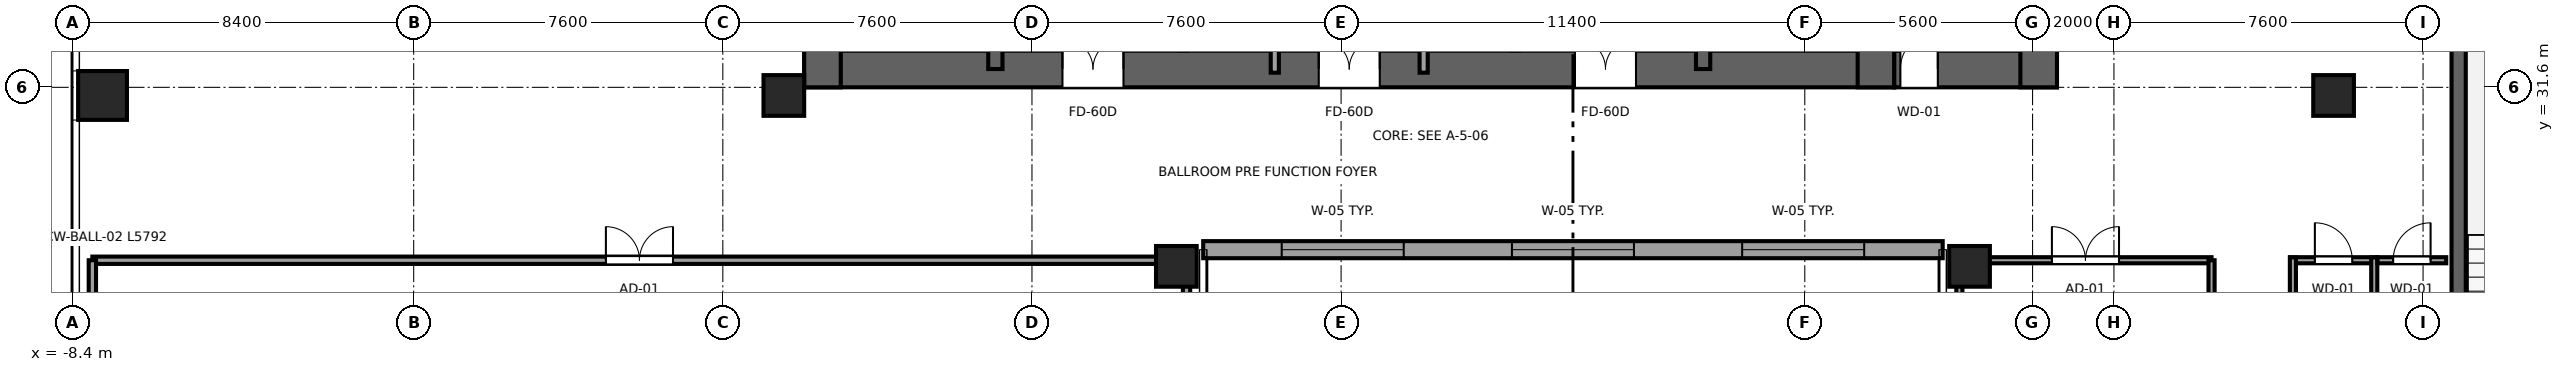
"""IFC4 building model, lengths in metres.
Left out: names, types, materials, properties, quantities, classifications, styles, units other than length and angle.
Written with IfcOpenShell. Run it as: python <this file> out.ifc"""

import sys

from ifc_helpers import new_model, si_unit, direction, frame, frame_2d, origin, origin_2d, place, context, subcontext, project, spatial, rectangle, circle, extrude, source, transform, mapped, element, fill, save


model = new_model("IFC4")
c1 = context("Model", 3, precision=1e-05, world=origin(), true_north=direction((0.0, 1.0)))
c2 = subcontext(c1, "Body", "Model", "MODEL_VIEW")
j1 = project(units=[si_unit("LENGTHUNIT", "METRE"), si_unit("PLANEANGLEUNIT", "RADIAN")], contexts=[c1])
p1 = place(None, origin())
s1 = spatial("IfcSite", under=j1, at=p1, CompositionType="ELEMENT")
p2 = place(p1, origin())
s2 = spatial("IfcBuilding", under=s1, at=p2, CompositionType="ELEMENT")
p3 = place(p2, frame((0.0, 0.0, 16.0)))
s3 = spatial("IfcBuildingStorey", under=s2, at=p3, CompositionType="ELEMENT", Elevation=16.0)
p4 = place(p3, frame((9.6, 32.05, 0.0), z_axis=(0.0, 0.0, 1.0), x_axis=(1.0, 0.0, 0.0)))
e1 = element("IfcWall", 1, at=p4, inside=s3, PredefinedType="SHEAR", context=c2, shape_type="SweptSolid", body=[
    extrude(rectangle(XDim=26.8, YDim=0.9, at=frame_2d((13.4, 0.0))), origin(), (0.0, 0.0, 1.0), 6.4),
])
p5 = place(p4, frame((7.85, 0.0, 0.0), z_axis=(0.0, 0.0, 1.0), x_axis=(-1.0, 0.0, 0.0)))
e2 = element("IfcOpeningElement", 2, at=p5, cuts=e1, PredefinedType="OPENING", context=c2, shape_type="SweptSolid", body=[
    extrude(rectangle(XDim=1.5, YDim=2.04, at=frame_2d((0.75, 1.02))), frame((0.0, 0.46, 0.0), z_axis=(0.0, -1.0, 0.0), x_axis=(1.0, 0.0, 0.0)), (0.0, 0.0, 1.0), 0.92),
])
p6 = place(p4, frame((14.15, 0.0, 0.0), z_axis=(0.0, 0.0, 1.0), x_axis=(-1.0, 0.0, 0.0)))
e3 = element("IfcOpeningElement", 3, at=p6, cuts=e1, PredefinedType="OPENING", context=c2, shape_type="SweptSolid", body=[
    extrude(rectangle(XDim=1.5, YDim=2.04, at=frame_2d((0.75, 1.02))), frame((0.0, 0.46, 0.0), z_axis=(0.0, -1.0, 0.0), x_axis=(1.0, 0.0, 0.0)), (0.0, 0.0, 1.0), 0.92),
])
p7 = place(p4, frame((20.45, 0.0, 0.0), z_axis=(0.0, 0.0, 1.0), x_axis=(-1.0, 0.0, 0.0)))
e4 = element("IfcOpeningElement", 4, at=p7, cuts=e1, PredefinedType="OPENING", context=c2, shape_type="SweptSolid", body=[
    extrude(rectangle(XDim=1.5, YDim=2.04, at=frame_2d((0.75, 1.02))), frame((0.0, 0.46, 0.0), z_axis=(0.0, -1.0, 0.0), x_axis=(1.0, 0.0, 0.0)), (0.0, 0.0, 1.0), 0.92),
])
for number, where, z_axis, x_axis in (
    (5, (10.05, 31.6, 0.0), (0.0, 0.0, 1.0), (0.0, 1.0, 0.0)),
    (6, (35.95, 31.6, 0.0), (0.0, 0.0, 1.0), (0.0, 1.0, 0.0)),
):
    element("IfcWall", number, at=place(p3, frame(where, z_axis=z_axis, x_axis=x_axis)), inside=s3, PredefinedType="SHEAR", context=c2, shape_type="SweptSolid", body=[
        extrude(rectangle(XDim=13.6, YDim=0.9, at=frame_2d((6.8, 0.0))), origin(), (0.0, 0.0, 1.0), 6.4),
    ])
p8 = place(p3, frame((14.3, 32.05, 0.0), z_axis=(0.0, 0.0, 1.0), x_axis=(0.0, 1.0, 0.0)))
e7 = element("IfcWall", 7, at=p8, inside=s3, PredefinedType="SHEAR", context=c2, shape_type="SweptSolid", body=[
    extrude(rectangle(XDim=12.7, YDim=0.35, at=frame_2d((6.35, 0.0))), origin(), (0.0, 0.0, 1.0), 6.4),
])
p9 = place(p8, frame((0.5, 0.0, 0.0)))
e8 = element("IfcOpeningElement", 8, at=p9, cuts=e7, PredefinedType="OPENING", context=c2, shape_type="SweptSolid", body=[
    extrude(rectangle(XDim=1.1, YDim=2.12, at=frame_2d((0.55, 1.06))), frame((0.0, 0.185, 0.0), z_axis=(0.0, -1.0, 0.0), x_axis=(1.0, 0.0, 0.0)), (0.0, 0.0, 1.0), 0.37),
])
p10 = place(p3, frame((31.7, 32.05, 0.0), z_axis=(0.0, 0.0, 1.0), x_axis=(0.0, 1.0, 0.0)))
e9 = element("IfcWall", 9, at=p10, inside=s3, PredefinedType="SHEAR", context=c2, shape_type="SweptSolid", body=[
    extrude(rectangle(XDim=12.7, YDim=0.35, at=frame_2d((6.35, 0.0))), origin(), (0.0, 0.0, 1.0), 6.4),
])
p11 = place(p10, frame((1.6, 0.0, 0.0), z_axis=(0.0, 0.0, 1.0), x_axis=(-1.0, 0.0, 0.0)))
e10 = element("IfcOpeningElement", 10, at=p11, cuts=e9, PredefinedType="OPENING", context=c2, shape_type="SweptSolid", body=[
    extrude(rectangle(XDim=1.1, YDim=2.12, at=frame_2d((0.55, 1.06))), frame((0.0, 0.185, 0.0), z_axis=(0.0, -1.0, 0.0), x_axis=(1.0, 0.0, 0.0)), (0.0, 0.0, 1.0), 0.37),
])
p12 = place(p3, frame((36.4, 32.05, 0.0), z_axis=(0.0, 0.0, 1.0), x_axis=(1.0, 0.0, 0.0)))
e11 = element("IfcWall", 11, at=p12, inside=s3, PredefinedType="SHEAR", context=c2, shape_type="SweptSolid", body=[
    extrude(rectangle(XDim=4.0, YDim=0.9, at=frame_2d((2.0, 0.0))), origin(), (0.0, 0.0, 1.0), 6.4),
])
p13 = place(p12, frame((1.07, 0.0, 0.0), z_axis=(0.0, 0.0, 1.0), x_axis=(-1.0, 0.0, 0.0)))
e12 = element("IfcOpeningElement", 12, at=p13, cuts=e11, PredefinedType="OPENING", context=c2, shape_type="SweptSolid", body=[
    extrude(rectangle(XDim=0.92, YDim=2.01, at=frame_2d((0.46, 1.005))), frame((0.0, 0.46, 0.0), z_axis=(0.0, -1.0, 0.0), x_axis=(1.0, 0.0, 0.0)), (0.0, 0.0, 1.0), 0.92),
])
p14 = place(p3, frame((39.95, 31.6, 0.0), z_axis=(0.0, 0.0, 1.0), x_axis=(0.0, 1.0, 0.0)))
e13 = element("IfcWall", 13, at=p14, inside=s3, PredefinedType="SHEAR", context=c2, shape_type="SweptSolid", body=[
    extrude(rectangle(XDim=13.6, YDim=0.9, at=frame_2d((6.8, 0.0))), origin(), (0.0, 0.0, 1.0), 6.4),
])
p15 = place(p3, frame((50.275, 32.975, 0.0), z_axis=(0.0, 0.0, 1.0), x_axis=(0.0, -1.0, 0.0)))
e14 = element("IfcWall", 14, at=p15, inside=s3, PredefinedType="SHEAR", context=c2, shape_type="SweptSolid", body=[
    extrude(rectangle(XDim=12.95, YDim=0.35, at=frame_2d((6.475, 0.0))), origin(), (0.0, 0.0, 1.0), 6.4),
])
m1 = source(origin(), c2, "Body", "SweptSolid", [
    extrude(rectangle(XDim=1.2, YDim=1.2, at=origin_2d()), origin(), (0.0, 0.0, 1.0), 6.4),
])
p16 = place(p3, frame((-7.65, 31.4, 0.0), z_axis=(0.0, 0.0, 1.0), x_axis=(1.0, 0.0, 0.0)))
e15 = element("IfcColumn", 15, at=p16, inside=s3, PredefinedType="COLUMN", context=c2, shape_type="MappedRepresentation", body=[
    mapped(m1, transform((0.0, 0.0, 0.0), x_axis=(1.0, 0.0, 0.0), y_axis=(0.0, 1.0, 0.0), z_axis=(0.0, 0.0, 1.0), scale=1.0)),
])
m2 = source(origin(), c2, "Body", "SweptSolid", [
    extrude(circle(Radius=0.5, at=origin_2d()), origin(), (0.0, 0.0, 1.0), 6.4),
])
for number, where, z_axis, x_axis in (
    (16, (18.75, 27.2, 0.0), (0.0, 0.0, 1.0), (1.0, 0.0, 0.0)),
    (17, (38.25, 27.2, 0.0), (0.0, 0.0, 1.0), (1.0, 0.0, 0.0)),
):
    element("IfcColumn", number, at=place(p3, frame(where, z_axis=z_axis, x_axis=x_axis)), inside=s3, PredefinedType="COLUMN", context=c2, shape_type="MappedRepresentation", body=[
        mapped(m2, transform((0.0, 0.0, 0.0), x_axis=(1.0, 0.0, 0.0), y_axis=(0.0, 1.0, 0.0), z_axis=(0.0, 0.0, 1.0), scale=1.0)),
    ])
m3 = source(origin(), c2, "Body", "SweptSolid", [
    extrude(rectangle(XDim=1.0, YDim=1.0, at=origin_2d()), origin(), (0.0, 0.0, 1.0), 6.4),
])
for number, where, z_axis, x_axis in (
    (18, (47.2, 31.4, 0.0), (0.0, 0.0, 1.0), (1.0, 0.0, 0.0)),
    (19, (9.1, 31.4, 0.0), (0.0, 0.0, 1.0), (1.0, 0.0, 0.0)),
):
    element("IfcColumn", number, at=place(p3, frame(where, z_axis=z_axis, x_axis=x_axis)), inside=s3, PredefinedType="COLUMN", context=c2, shape_type="MappedRepresentation", body=[
        mapped(m3, transform((0.0, 0.0, 0.0), x_axis=(1.0, 0.0, 0.0), y_axis=(0.0, 1.0, 0.0), z_axis=(0.0, 0.0, 1.0), scale=1.0)),
    ])
p17 = place(p3, frame((19.41, 27.61, 0.0), z_axis=(0.0, 0.0, 1.0), x_axis=(1.0, 0.0, 0.0)))
e20 = element("IfcWall", 20, at=p17, inside=s3, PredefinedType="SOLIDWALL", context=c2, shape_type="SweptSolid", body=[
    extrude(rectangle(XDim=18.18, YDim=0.42, at=frame_2d((9.09, 0.0))), origin(), (0.0, 0.0, 1.0), 3.73),
])
p18 = place(p17, frame((1.93, 0.0, 0.65)))
e21 = element("IfcOpeningElement", 21, at=p18, cuts=e20, PredefinedType="OPENING", context=c2, shape_type="SweptSolid", body=[
    extrude(rectangle(XDim=3.0, YDim=2.5, at=frame_2d((1.5, 1.25))), frame((0.0, 0.22, 0.0), z_axis=(0.0, -1.0, 0.0), x_axis=(1.0, 0.0, 0.0)), (0.0, 0.0, 1.0), 0.44),
])
p19 = place(p17, frame((7.59, 0.0, 0.65)))
e22 = element("IfcOpeningElement", 22, at=p19, cuts=e20, PredefinedType="OPENING", context=c2, shape_type="SweptSolid", body=[
    extrude(rectangle(XDim=3.0, YDim=2.5, at=frame_2d((1.5, 1.25))), frame((0.0, 0.22, 0.0), z_axis=(0.0, -1.0, 0.0), x_axis=(1.0, 0.0, 0.0)), (0.0, 0.0, 1.0), 0.44),
])
p20 = place(p17, frame((13.25, 0.0, 0.65)))
e23 = element("IfcOpeningElement", 23, at=p20, cuts=e20, PredefinedType="OPENING", context=c2, shape_type="SweptSolid", body=[
    extrude(rectangle(XDim=3.0, YDim=2.5, at=frame_2d((1.5, 1.25))), frame((0.0, 0.22, 0.0), z_axis=(0.0, -1.0, 0.0), x_axis=(1.0, 0.0, 0.0)), (0.0, 0.0, 1.0), 0.44),
])
for number, where, z_axis, x_axis in (
    (24, (21.17, 31.96, 0.0), (0.0, 0.0, 1.0), (0.0, 1.0, 0.0)),
    (25, (24.83, 31.96, 0.0), (0.0, 0.0, 1.0), (0.0, 1.0, 0.0)),
):
    element("IfcWall", number, at=place(p3, frame(where, z_axis=z_axis, x_axis=x_axis)), inside=s3, PredefinedType="SOLIDWALL", context=c2, shape_type="SweptSolid", body=[
        extrude(rectangle(XDim=12.58, YDim=0.2, at=frame_2d((6.29, 0.0))), origin(), (0.0, 0.0, 1.0), 6.14),
    ])
p21 = place(p3, frame((-7.9, 27.35, 0.0), z_axis=(0.0, 0.0, 1.0), x_axis=(1.0, 0.0, 0.0)))
e26 = element("IfcWall", 26, at=p21, inside=s3, PredefinedType="PARTITIONING", context=c2, shape_type="SweptSolid", body=[
    extrude(rectangle(XDim=26.9, YDim=0.18, at=frame_2d((13.45, 0.0))), origin(), (0.0, 0.0, 1.0), 3.73),
])
p22 = place(p21, frame((12.625, 0.0, 0.0)))
e27 = element("IfcOpeningElement", 27, at=p22, cuts=e26, PredefinedType="OPENING", context=c2, shape_type="SweptSolid", body=[
    extrude(rectangle(XDim=1.65, YDim=2.15, at=frame_2d((0.825, 1.075))), frame((0.0, 0.1, 0.0), z_axis=(0.0, -1.0, 0.0), x_axis=(1.0, 0.0, 0.0)), (0.0, 0.0, 1.0), 0.2),
])
for number, where, z_axis, x_axis in (
    (28, (-7.9, -2.0, 0.0), (0.0, 0.0, 1.0), (0.0, 1.0, 0.0)),
    (29, (19.0, -2.0, 0.0), (0.0, 0.0, 1.0), (0.0, 1.0, 0.0)),
):
    element("IfcWall", number, at=place(p3, frame(where, z_axis=z_axis, x_axis=x_axis)), inside=s3, PredefinedType="PARTITIONING", context=c2, shape_type="SweptSolid", body=[
        extrude(rectangle(XDim=29.35, YDim=0.18, at=frame_2d((14.675, 0.0))), origin(), (0.0, 0.0, 1.0), 6.14),
    ])
p23 = place(p3, frame((38.0, 27.35, 0.0), z_axis=(0.0, 0.0, 1.0), x_axis=(1.0, 0.0, 0.0)))
e30 = element("IfcWall", 30, at=p23, inside=s3, PredefinedType="PARTITIONING", context=c2, shape_type="SweptSolid", body=[
    extrude(rectangle(XDim=6.2, YDim=0.15, at=frame_2d((3.1, 0.0))), origin(), (0.0, 0.0, 1.0), 3.73),
])
p24 = place(p23, frame((2.275, 0.0, 0.0)))
e31 = element("IfcOpeningElement", 31, at=p24, cuts=e30, PredefinedType="OPENING", context=c2, shape_type="SweptSolid", body=[
    extrude(rectangle(XDim=1.65, YDim=2.15, at=frame_2d((0.825, 1.075))), frame((0.0, 0.085, 0.0), z_axis=(0.0, -1.0, 0.0), x_axis=(1.0, 0.0, 0.0)), (0.0, 0.0, 1.0), 0.17),
])
p25 = place(p3, frame((38.0, 15.6, 0.0), z_axis=(0.0, 0.0, 1.0), x_axis=(0.0, 1.0, 0.0)))
e32 = element("IfcWall", 32, at=p25, inside=s3, PredefinedType="PARTITIONING", context=c2, shape_type="SweptSolid", body=[
    extrude(rectangle(XDim=11.75, YDim=0.15, at=frame_2d((5.875, 0.0))), origin(), (0.0, 0.0, 1.0), 6.14),
])
p26 = place(p3, frame((44.2, 15.6, 0.0), z_axis=(0.0, 0.0, 1.0), x_axis=(0.0, 1.0, 0.0)))
e33 = element("IfcWall", 33, at=p26, inside=s3, PredefinedType="PARTITIONING", context=c2, shape_type="SweptSolid", body=[
    extrude(rectangle(XDim=11.75, YDim=0.15, at=frame_2d((5.875, 0.0))), origin(), (0.0, 0.0, 1.0), 5.676),
])
p27 = place(p3, frame((46.13, 27.35, 0.0), z_axis=(0.0, 0.0, 1.0), x_axis=(1.0, 0.0, 0.0)))
e34 = element("IfcWall", 34, at=p27, inside=s3, PredefinedType="PARTITIONING", context=c2, shape_type="SweptSolid", body=[
    extrude(rectangle(XDim=2.14, YDim=0.15, at=frame_2d((1.07, 0.0))), origin(), (0.0, 0.0, 1.0), 6.14),
])
p28 = place(p27, frame((0.61, 0.0, 0.0)))
e35 = element("IfcOpeningElement", 35, at=p28, cuts=e34, PredefinedType="OPENING", context=c2, shape_type="SweptSolid", body=[
    extrude(rectangle(XDim=0.92, YDim=2.01, at=frame_2d((0.46, 1.005))), frame((0.0, 0.085, 0.0), z_axis=(0.0, -1.0, 0.0), x_axis=(1.0, 0.0, 0.0)), (0.0, 0.0, 1.0), 0.17),
])
for number, where, z_axis, x_axis in (
    (36, (46.2, 20.48, 0.0), (0.0, 0.0, 1.0), (0.0, 1.0, 0.0)),
    (37, (48.2, 20.48, 0.0), (0.0, 0.0, 1.0), (0.0, 1.0, 0.0)),
):
    element("IfcWall", number, at=place(p3, frame(where, z_axis=z_axis, x_axis=x_axis)), inside=s3, PredefinedType="PARTITIONING", context=c2, shape_type="SweptSolid", body=[
        extrude(rectangle(XDim=6.94, YDim=0.15, at=frame_2d((3.47, 0.0))), origin(), (0.0, 0.0, 1.0), 6.14),
    ])
p29 = place(p3, frame((48.28, 27.35, 0.0), z_axis=(0.0, 0.0, 1.0), x_axis=(1.0, 0.0, 0.0)))
e38 = element("IfcWall", 38, at=p29, inside=s3, PredefinedType="PARTITIONING", context=c2, shape_type="SweptSolid", body=[
    extrude(rectangle(XDim=1.69, YDim=0.15, at=frame_2d((0.845, 0.0))), origin(), (0.0, 0.0, 1.0), 6.14),
])
p30 = place(p29, frame((0.385, 0.0, 0.0)))
e39 = element("IfcOpeningElement", 39, at=p30, cuts=e38, PredefinedType="OPENING", context=c2, shape_type="SweptSolid", body=[
    extrude(rectangle(XDim=0.92, YDim=2.01, at=frame_2d((0.46, 1.005))), frame((0.0, 0.085, 0.0), z_axis=(0.0, -1.0, 0.0), x_axis=(1.0, 0.0, 0.0)), (0.0, 0.0, 1.0), 0.17),
])
m4 = source(origin(), c2, "Body", "SweptSolid", [
    extrude(rectangle(XDim=3.0, YDim=2.5, at=frame_2d((1.5, 1.25))), frame((0.0, 0.09, 0.0), z_axis=(0.0, -1.0, 0.0), x_axis=(1.0, 0.0, 0.0)), (0.0, 0.0, 1.0), 0.06),
])
p31 = place(p18, origin())
e40 = element("IfcWindow", 40, at=p31, inside=s3, PartitioningType="TRIPLE_PANEL_HORIZONTAL", PredefinedType="WINDOW", context=c2, shape_type="MappedRepresentation", body=[
    mapped(m4, transform((0.0, 0.0, 0.0), x_axis=(1.0, 0.0, 0.0), y_axis=(0.0, 1.0, 0.0), z_axis=(0.0, 0.0, 1.0), scale=1.0)),
])
fill(e21, e40)
p32 = place(p19, origin())
e41 = element("IfcWindow", 41, at=p32, inside=s3, PartitioningType="TRIPLE_PANEL_HORIZONTAL", PredefinedType="WINDOW", context=c2, shape_type="MappedRepresentation", body=[
    mapped(m4, transform((0.0, 0.0, 0.0), x_axis=(1.0, 0.0, 0.0), y_axis=(0.0, 1.0, 0.0), z_axis=(0.0, 0.0, 1.0), scale=1.0)),
])
fill(e22, e41)
p33 = place(p20, origin())
e42 = element("IfcWindow", 42, at=p33, inside=s3, PartitioningType="TRIPLE_PANEL_HORIZONTAL", PredefinedType="WINDOW", context=c2, shape_type="MappedRepresentation", body=[
    mapped(m4, transform((0.0, 0.0, 0.0), x_axis=(1.0, 0.0, 0.0), y_axis=(0.0, 1.0, 0.0), z_axis=(0.0, 0.0, 1.0), scale=1.0)),
])
fill(e23, e42)
m5 = source(origin(), c2, "Body", "SweptSolid", [
    extrude(rectangle(XDim=1.5, YDim=2.04, at=frame_2d((0.75, 1.02))), frame((0.0, 0.025, 0.0), z_axis=(0.0, -1.0, 0.0), x_axis=(1.0, 0.0, 0.0)), (0.0, 0.0, 1.0), 0.05),
])
p34 = place(p5, origin())
e43 = element("IfcDoor", 43, at=p34, inside=s3, OperationType="DOUBLE_DOOR_SINGLE_SWING", PredefinedType="DOOR", context=c2, shape_type="MappedRepresentation", body=[
    mapped(m5, transform((0.0, 0.0, 0.0), x_axis=(1.0, 0.0, 0.0), y_axis=(0.0, 1.0, 0.0), z_axis=(0.0, 0.0, 1.0), scale=1.0)),
])
fill(e2, e43)
p35 = place(p6, origin())
e44 = element("IfcDoor", 44, at=p35, inside=s3, OperationType="DOUBLE_DOOR_SINGLE_SWING", PredefinedType="DOOR", context=c2, shape_type="MappedRepresentation", body=[
    mapped(m5, transform((0.0, 0.0, 0.0), x_axis=(1.0, 0.0, 0.0), y_axis=(0.0, 1.0, 0.0), z_axis=(0.0, 0.0, 1.0), scale=1.0)),
])
fill(e3, e44)
p36 = place(p7, origin())
e45 = element("IfcDoor", 45, at=p36, inside=s3, OperationType="DOUBLE_DOOR_SINGLE_SWING", PredefinedType="DOOR", context=c2, shape_type="MappedRepresentation", body=[
    mapped(m5, transform((0.0, 0.0, 0.0), x_axis=(1.0, 0.0, 0.0), y_axis=(0.0, 1.0, 0.0), z_axis=(0.0, 0.0, 1.0), scale=1.0)),
])
fill(e4, e45)
m6 = source(origin(), c2, "Body", "SweptSolid", [
    extrude(rectangle(XDim=0.92, YDim=2.01, at=frame_2d((0.46, 1.005))), frame((0.0, 0.025, 0.0), z_axis=(0.0, -1.0, 0.0), x_axis=(1.0, 0.0, 0.0)), (0.0, 0.0, 1.0), 0.05),
])
p37 = place(p13, origin())
e46 = element("IfcDoor", 46, at=p37, inside=s3, OperationType="SINGLE_SWING_RIGHT", PredefinedType="DOOR", context=c2, shape_type="MappedRepresentation", body=[
    mapped(m6, transform((0.0, 0.0, 0.0), x_axis=(1.0, 0.0, 0.0), y_axis=(0.0, 1.0, 0.0), z_axis=(0.0, 0.0, 1.0), scale=1.0)),
])
fill(e12, e46)
m7 = source(origin(), c2, "Body", "SweptSolid", [
    extrude(rectangle(XDim=1.65, YDim=2.15, at=frame_2d((0.825, 1.075))), frame((0.0, 0.025, 0.0), z_axis=(0.0, -1.0, 0.0), x_axis=(1.0, 0.0, 0.0)), (0.0, 0.0, 1.0), 0.05),
])
p38 = place(p22, origin())
e47 = element("IfcDoor", 47, at=p38, inside=s3, OperationType="DOUBLE_DOOR_SINGLE_SWING", PredefinedType="DOOR", context=c2, shape_type="MappedRepresentation", body=[
    mapped(m7, transform((0.0, 0.0, 0.0), x_axis=(1.0, 0.0, 0.0), y_axis=(0.0, 1.0, 0.0), z_axis=(0.0, 0.0, 1.0), scale=1.0)),
])
fill(e27, e47)
p39 = place(p24, origin())
e48 = element("IfcDoor", 48, at=p39, inside=s3, OperationType="DOUBLE_DOOR_SINGLE_SWING", PredefinedType="DOOR", context=c2, shape_type="MappedRepresentation", body=[
    mapped(m7, transform((0.0, 0.0, 0.0), x_axis=(1.0, 0.0, 0.0), y_axis=(0.0, 1.0, 0.0), z_axis=(0.0, 0.0, 1.0), scale=1.0)),
])
fill(e31, e48)
p40 = place(p28, origin())
e49 = element("IfcDoor", 49, at=p40, inside=s3, OperationType="SINGLE_SWING_LEFT", PredefinedType="DOOR", context=c2, shape_type="MappedRepresentation", body=[
    mapped(m6, transform((0.0, 0.0, 0.0), x_axis=(1.0, 0.0, 0.0), y_axis=(0.0, 1.0, 0.0), z_axis=(0.0, 0.0, 1.0), scale=1.0)),
])
fill(e35, e49)
p41 = place(p30, origin())
e50 = element("IfcDoor", 50, at=p41, inside=s3, OperationType="SINGLE_SWING_RIGHT", PredefinedType="DOOR", context=c2, shape_type="MappedRepresentation", body=[
    mapped(m6, transform((0.0, 0.0, 0.0), x_axis=(1.0, 0.0, 0.0), y_axis=(0.0, 1.0, 0.0), z_axis=(0.0, 0.0, 1.0), scale=1.0)),
])
fill(e39, e50)
save(model, sys.argv[1])
